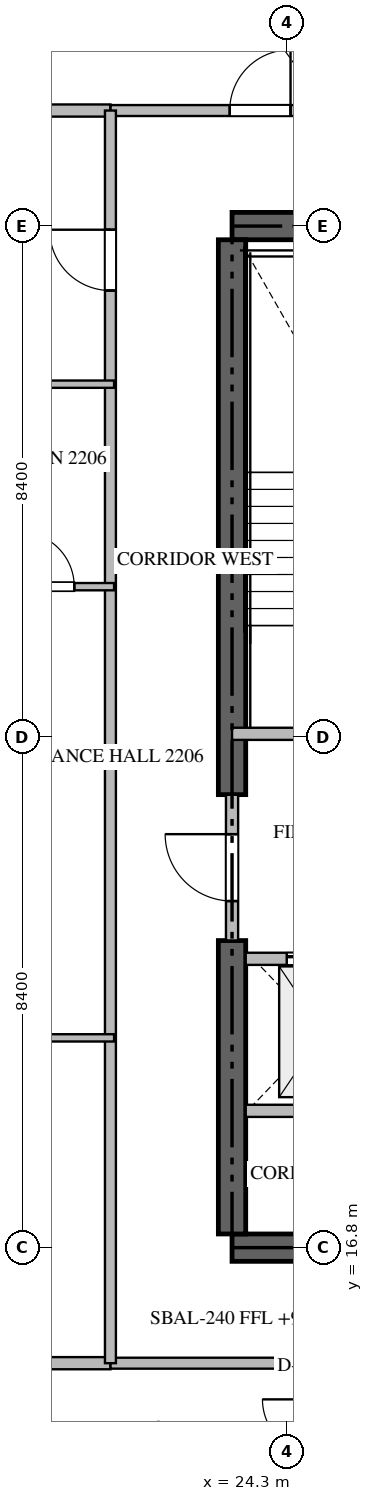
"""IFC4 building model, lengths in metres.
Left out: names, types, materials, properties, quantities, classifications, styles, units other than length and angle.
Written with IfcOpenShell. Run it as: python <this file> out.ifc"""

import sys

from ifc_helpers import new_model, si_unit, direction, frame, frame_2d, origin, place, context, subcontext, project, spatial, rectangle, extrude, source, transform, mapped, element, fill, save


model = new_model("IFC4")
c1 = context("Model", 3, precision=1e-05, world=origin(), true_north=direction((0.0, 1.0)))
c2 = subcontext(c1, "Body", "Model", "MODEL_VIEW")
j1 = project(units=[si_unit("LENGTHUNIT", "METRE"), si_unit("PLANEANGLEUNIT", "RADIAN")], contexts=[c1])
p1 = place(None, origin())
s1 = spatial("IfcSite", under=j1, at=p1, CompositionType="ELEMENT")
p2 = place(p1, origin())
s2 = spatial("IfcBuilding", under=s1, at=p2, CompositionType="ELEMENT")
p3 = place(p2, frame((0.0, 0.0, 90.45)))
s3 = spatial("IfcBuildingStorey", under=s2, at=p3, CompositionType="ELEMENT", Elevation=90.45)
for number, where, z_axis, x_axis in (
    (1, (23.4, 16.8, -0.26), (0.0, 0.0, 1.0), (1.0, 0.0, 0.0)),
    (2, (41.4, 33.6, -0.26), (0.0, 0.0, 1.0), (-1.0, 0.0, 0.0)),
):
    element("IfcWall", number, at=place(p3, frame(where, z_axis=z_axis, x_axis=x_axis)), inside=s3, PredefinedType="SHEAR", context=c2, shape_type="SweptSolid", body=[
        extrude(rectangle(XDim=18.0, YDim=0.45, at=frame_2d((9.0, 0.0))), origin(), (0.0, 0.0, 1.0), 3.748),
    ])
p4 = place(p3, frame((23.4, 17.025, -0.26), z_axis=(0.0, 0.0, 1.0), x_axis=(0.0, 1.0, 0.0)))
e3 = element("IfcWall", 3, at=p4, inside=s3, PredefinedType="SHEAR", context=c2, shape_type="SweptSolid", body=[
    extrude(rectangle(XDim=4.825, YDim=0.45, at=frame_2d((2.413, 0.0))), origin(), (0.0, 0.0, 1.0), 3.748),
])
p5 = place(p3, frame((23.4, 24.25, -0.26), z_axis=(0.0, 0.0, 1.0), x_axis=(0.0, 1.0, 0.0)))
e4 = element("IfcWall", 4, at=p5, inside=s3, PredefinedType="SHEAR", context=c2, shape_type="SweptSolid", body=[
    extrude(rectangle(XDim=9.125, YDim=0.45, at=frame_2d((4.562, 0.0))), origin(), (0.0, 0.0, 1.0), 3.748),
])
p6 = place(p3, frame((23.4, 25.25, 0.0), z_axis=(0.0, 0.0, 1.0), x_axis=(1.0, 0.0, 0.0)))
e5 = element("IfcWall", 5, at=p6, inside=s3, PredefinedType="STANDARD", context=c2, shape_type="SweptSolid", body=[
    extrude(rectangle(XDim=4.45, YDim=0.2, at=frame_2d((2.225, 0.0))), origin(), (0.0, 0.0, 1.0), 3.49),
])
p7 = place(p6, frame((1.65, 0.0, 0.0)))
e6 = element("IfcOpeningElement", 6, at=p7, cuts=e5, PredefinedType="OPENING", context=c2, shape_type="SweptSolid", body=[
    extrude(rectangle(XDim=1.1, YDim=2.15, at=frame_2d((0.55, 1.075))), frame((0.0, 0.11, 0.0), z_axis=(0.0, -1.0, 0.0), x_axis=(1.0, 0.0, 0.0)), (0.0, 0.0, 1.0), 0.22),
])
p8 = place(p3, frame((23.625, 21.55, 0.0), z_axis=(0.0, 0.0, 1.0), x_axis=(1.0, 0.0, 0.0)))
e7 = element("IfcWall", 7, at=p8, inside=s3, PredefinedType="STANDARD", context=c2, shape_type="SweptSolid", body=[
    extrude(rectangle(XDim=2.425, YDim=0.2, at=frame_2d((1.212, 0.0))), origin(), (0.0, 0.0, 1.0), 3.49),
])
p9 = place(p8, frame((0.675, 0.0, 0.0)))
e8 = element("IfcOpeningElement", 8, at=p9, cuts=e7, PredefinedType="OPENING", context=c2, shape_type="SweptSolid", body=[
    extrude(rectangle(XDim=1.2, YDim=2.2, at=frame_2d((0.6, 1.1))), frame((0.0, 0.11, 0.0), z_axis=(0.0, -1.0, 0.0), x_axis=(1.0, 0.0, 0.0)), (0.0, 0.0, 1.0), 0.22),
])
p10 = place(p3, frame((23.625, 19.05, 0.0), z_axis=(0.0, 0.0, 1.0), x_axis=(1.0, 0.0, 0.0)))
e9 = element("IfcWall", 9, at=p10, inside=s3, PredefinedType="STANDARD", context=c2, shape_type="SweptSolid", body=[
    extrude(rectangle(XDim=2.425, YDim=0.2, at=frame_2d((1.212, 0.0))), origin(), (0.0, 0.0, 1.0), 3.49),
])
p11 = place(p3, frame((23.4, 21.852, 0.0), z_axis=(0.0, 0.0, 1.0), x_axis=(0.0, 1.0, 0.0)))
e10 = element("IfcWall", 10, at=p11, inside=s3, PredefinedType="STANDARD", context=c2, shape_type="SweptSolid", body=[
    extrude(rectangle(XDim=2.396, YDim=0.2, at=frame_2d((1.198, 0.0))), origin(), (0.0, 0.0, 1.0), 3.49),
])
p12 = place(p11, frame((0.648, 0.0, 0.0)))
e11 = element("IfcOpeningElement", 11, at=p12, cuts=e10, PredefinedType="OPENING", context=c2, shape_type="SweptSolid", body=[
    extrude(rectangle(XDim=1.1, YDim=2.15, at=frame_2d((0.55, 1.075))), frame((0.0, 0.11, 0.0), z_axis=(0.0, -1.0, 0.0), x_axis=(1.0, 0.0, 0.0)), (0.0, 0.0, 1.0), 0.22),
])
for number, where, z_axis, x_axis in (
    (12, (6.082, 14.9, 0.0), (0.0, 0.0, 1.0), (1.0, 0.0, 0.0)),
    (13, (6.082, 35.5, 0.0), (0.0, 0.0, 1.0), (1.0, 0.0, 0.0)),
):
    element("IfcWall", number, at=place(p3, frame(where, z_axis=z_axis, x_axis=x_axis)), inside=s3, PredefinedType="PARTITIONING", context=c2, shape_type="SweptSolid", body=[
        extrude(rectangle(XDim=15.318, YDim=0.2, at=frame_2d((7.659, 0.0))), origin(), (0.0, 0.0, 1.0), 3.49),
    ])
p13 = place(p3, frame((21.402, 14.9, 0.0), z_axis=(0.0, 0.0, 1.0), x_axis=(1.0, 0.0, 0.0)))
e14 = element("IfcWall", 14, at=p13, inside=s3, PredefinedType="PARTITIONING", context=c2, shape_type="SweptSolid", body=[
    extrude(rectangle(XDim=21.996, YDim=0.18, at=frame_2d((10.998, 0.0))), origin(), (0.0, 0.0, 1.0), 3.49),
])
p14 = place(p13, frame((7.202, 0.0, 0.0)))
e15 = element("IfcOpeningElement", 15, at=p14, cuts=e14, PredefinedType="OPENING", context=c2, shape_type="SweptSolid", body=[
    extrude(rectangle(XDim=1.0, YDim=2.15, at=frame_2d((0.5, 1.075))), frame((0.0, 0.1, 0.0), z_axis=(0.0, -1.0, 0.0), x_axis=(1.0, 0.0, 0.0)), (0.0, 0.0, 1.0), 0.2),
])
p15 = place(p3, frame((21.402, 35.5, 0.0), z_axis=(0.0, 0.0, 1.0), x_axis=(1.0, 0.0, 0.0)))
e16 = element("IfcWall", 16, at=p15, inside=s3, PredefinedType="PARTITIONING", context=c2, shape_type="SweptSolid", body=[
    extrude(rectangle(XDim=21.996, YDim=0.18, at=frame_2d((10.998, 0.0))), origin(), (0.0, 0.0, 1.0), 3.49),
])
p16 = place(p15, frame((1.96, 0.0, 0.0)))
e17 = element("IfcOpeningElement", 17, at=p16, cuts=e16, PredefinedType="OPENING", context=c2, shape_type="SweptSolid", body=[
    extrude(rectangle(XDim=1.0, YDim=2.15, at=frame_2d((0.5, 1.075))), frame((0.0, 0.1, 0.0), z_axis=(0.0, -1.0, 0.0), x_axis=(1.0, 0.0, 0.0)), (0.0, 0.0, 1.0), 0.2),
])
p17 = place(p15, frame((5.249, 0.0, 0.0)))
e18 = element("IfcOpeningElement", 18, at=p17, cuts=e16, PredefinedType="OPENING", context=c2, shape_type="SweptSolid", body=[
    extrude(rectangle(XDim=1.0, YDim=2.15, at=frame_2d((0.5, 1.075))), frame((0.0, 0.1, 0.0), z_axis=(0.0, -1.0, 0.0), x_axis=(1.0, 0.0, 0.0)), (0.0, 0.0, 1.0), 0.2),
])
p18 = place(p15, frame((11.653, 0.0, 0.0)))
e19 = element("IfcOpeningElement", 19, at=p18, cuts=e16, PredefinedType="OPENING", context=c2, shape_type="SweptSolid", body=[
    extrude(rectangle(XDim=1.0, YDim=2.15, at=frame_2d((0.5, 1.075))), frame((0.0, 0.1, 0.0), z_axis=(0.0, -1.0, 0.0), x_axis=(1.0, 0.0, 0.0)), (0.0, 0.0, 1.0), 0.2),
])
p19 = place(p15, frame((18.896, 0.0, 0.0)))
e20 = element("IfcOpeningElement", 20, at=p19, cuts=e16, PredefinedType="OPENING", context=c2, shape_type="SweptSolid", body=[
    extrude(rectangle(XDim=1.0, YDim=2.15, at=frame_2d((0.5, 1.075))), frame((0.0, 0.1, 0.0), z_axis=(0.0, -1.0, 0.0), x_axis=(1.0, 0.0, 0.0)), (0.0, 0.0, 1.0), 0.2),
])
p20 = place(p3, frame((21.4, 14.9, 0.0), z_axis=(0.0, 0.0, 1.0), x_axis=(0.0, 1.0, 0.0)))
e21 = element("IfcWall", 21, at=p20, inside=s3, PredefinedType="PARTITIONING", context=c2, shape_type="SweptSolid", body=[
    extrude(rectangle(XDim=20.6, YDim=0.18, at=frame_2d((10.3, 0.0))), origin(), (0.0, 0.0, 1.0), 3.49),
])
p21 = place(p20, frame((17.64, 0.0, 0.0)))
e22 = element("IfcOpeningElement", 22, at=p21, cuts=e21, PredefinedType="OPENING", context=c2, shape_type="SweptSolid", body=[
    extrude(rectangle(XDim=1.0, YDim=2.15, at=frame_2d((0.5, 1.075))), frame((0.0, 0.1, 0.0), z_axis=(0.0, -1.0, 0.0), x_axis=(1.0, 0.0, 0.0)), (0.0, 0.0, 1.0), 0.2),
])
p22 = place(p3, frame((18.65, 31.0, 0.0), z_axis=(0.0, 0.0, 1.0), x_axis=(1.0, 0.0, 0.0)))
e23 = element("IfcWall", 23, at=p22, inside=s3, PredefinedType="PARTITIONING", context=c2, shape_type="SweptSolid", body=[
    extrude(rectangle(XDim=2.81, YDim=0.12, at=frame_2d((1.405, 0.0))), origin(), (0.0, 0.0, 1.0), 3.49),
])
p23 = place(p3, frame((19.25, 27.67, 0.0), z_axis=(0.0, 0.0, 1.0), x_axis=(1.0, 0.0, 0.0)))
e24 = element("IfcWall", 24, at=p23, inside=s3, PredefinedType="PARTITIONING", context=c2, shape_type="SweptSolid", body=[
    extrude(rectangle(XDim=2.21, YDim=0.12, at=frame_2d((1.105, 0.0))), origin(), (0.0, 0.0, 1.0), 3.49),
])
p24 = place(p23, frame((0.655, 0.0, 0.0)))
e25 = element("IfcOpeningElement", 25, at=p24, cuts=e24, PredefinedType="OPENING", context=c2, shape_type="SweptSolid", body=[
    extrude(rectangle(XDim=0.9, YDim=2.1, at=frame_2d((0.45, 1.05))), frame((0.0, 0.07, 0.0), z_axis=(0.0, -1.0, 0.0), x_axis=(1.0, 0.0, 0.0)), (0.0, 0.0, 1.0), 0.14),
])
p25 = place(p3, frame((19.252, 20.25, 0.0), z_axis=(0.0, 0.0, 1.0), x_axis=(1.0, 0.0, 0.0)))
e26 = element("IfcWall", 26, at=p25, inside=s3, PredefinedType="PARTITIONING", context=c2, shape_type="SweptSolid", body=[
    extrude(rectangle(XDim=2.208, YDim=0.12, at=frame_2d((1.104, 0.0))), origin(), (0.0, 0.0, 1.0), 3.49),
])
m1 = source(origin(), c2, "Body", "SweptSolid", [
    extrude(rectangle(XDim=1.2, YDim=2.2, at=frame_2d((0.6, 1.1))), frame((0.0, 0.025, 0.0), z_axis=(0.0, -1.0, 0.0), x_axis=(1.0, 0.0, 0.0)), (0.0, 0.0, 1.0), 0.05),
])
p26 = place(p9, origin())
e27 = element("IfcDoor", 27, at=p26, inside=s3, OperationType="DOUBLE_DOOR_SLIDING", PredefinedType="DOOR", context=c2, shape_type="MappedRepresentation", body=[
    mapped(m1, transform((0.0, 0.0, 0.0), scale=1.0)),
])
fill(e8, e27)
m2 = source(origin(), c2, "Body", "SweptSolid", [
    extrude(rectangle(XDim=1.1, YDim=2.15, at=frame_2d((0.55, 1.075))), frame((0.0, 0.025, 0.0), z_axis=(0.0, -1.0, 0.0), x_axis=(1.0, 0.0, 0.0)), (0.0, 0.0, 1.0), 0.05),
])
p27 = place(p12, origin())
e28 = element("IfcDoor", 28, at=p27, inside=s3, OperationType="SINGLE_SWING_RIGHT", PredefinedType="DOOR", context=c2, shape_type="MappedRepresentation", body=[
    mapped(m2, transform((0.0, 0.0, 0.0), scale=1.0)),
])
fill(e11, e28)
m3 = source(origin(), c2, "Body", "SweptSolid", [
    extrude(rectangle(XDim=1.0, YDim=2.15, at=frame_2d((0.5, 1.075))), frame((0.0, 0.025, 0.0), z_axis=(0.0, -1.0, 0.0), x_axis=(1.0, 0.0, 0.0)), (0.0, 0.0, 1.0), 0.05),
])
p28 = place(p16, origin())
e29 = element("IfcDoor", 29, at=p28, inside=s3, OperationType="SINGLE_SWING_RIGHT", PredefinedType="DOOR", context=c2, shape_type="MappedRepresentation", body=[
    mapped(m3, transform((0.0, 0.0, 0.0), scale=1.0)),
])
fill(e17, e29)
p29 = place(p21, origin())
e30 = element("IfcDoor", 30, at=p29, inside=s3, OperationType="SINGLE_SWING_RIGHT", PredefinedType="DOOR", context=c2, shape_type="MappedRepresentation", body=[
    mapped(m3, transform((0.0, 0.0, 0.0), scale=1.0)),
])
fill(e22, e30)
m4 = source(origin(), c2, "Body", "SweptSolid", [
    extrude(rectangle(XDim=0.9, YDim=2.1, at=frame_2d((0.45, 1.05))), frame((0.0, 0.025, 0.0), z_axis=(0.0, -1.0, 0.0), x_axis=(1.0, 0.0, 0.0)), (0.0, 0.0, 1.0), 0.05),
])
p30 = place(p24, origin())
e31 = element("IfcDoor", 31, at=p30, inside=s3, OperationType="SINGLE_SWING_LEFT", PredefinedType="DOOR", context=c2, shape_type="MappedRepresentation", body=[
    mapped(m4, transform((0.0, 0.0, 0.0), scale=1.0)),
])
fill(e25, e31)
save(model, sys.argv[1])
